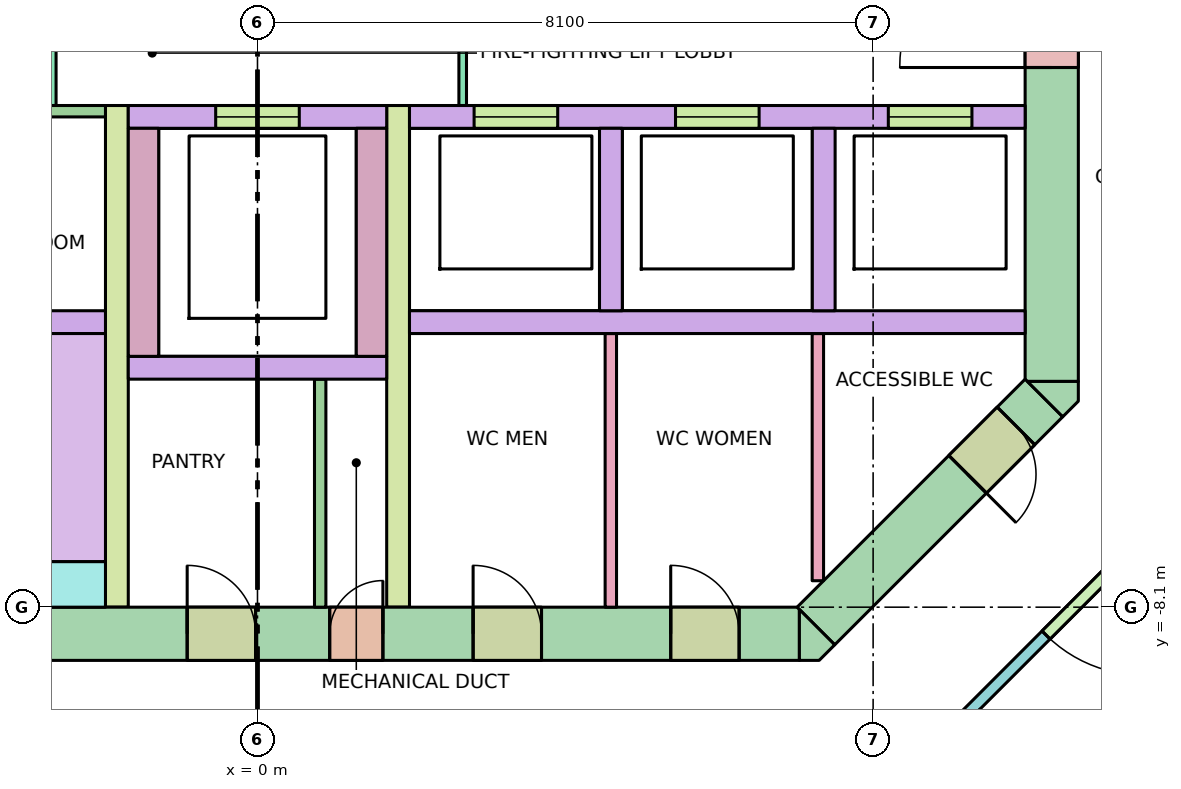
"""IFC4 building model, lengths in metres.
Left out: names, types, materials, properties, quantities, classifications, styles, units other than length and angle.
Written with IfcOpenShell. Run it as: python <this file> out.ifc"""

import sys

from ifc_helpers import new_model, si_unit, direction, frame, frame_2d, origin, place, context, subcontext, project, spatial, polyline, rectangle, outline, extrude, element, fill, save


model = new_model("IFC4")
c1 = context("Model", 3, precision=1e-05, world=origin(), true_north=direction((0.0, 1.0)))
c2 = subcontext(c1, "Body", "Model", "MODEL_VIEW")
j1 = project(units=[si_unit("LENGTHUNIT", "METRE"), si_unit("PLANEANGLEUNIT", "RADIAN")], contexts=[c1])
p1 = place(None, origin())
s1 = spatial("IfcSite", under=j1, at=p1, CompositionType="ELEMENT")
p2 = place(p1, origin())
s2 = spatial("IfcBuilding", under=s1, at=p2, CompositionType="ELEMENT")
p3 = place(p2, frame((0.0, 0.0, 176.4)))
s3 = spatial("IfcBuildingStorey", under=s2, at=p3, CompositionType="ELEMENT", Elevation=176.4)
p4 = place(p3, frame((-7.13, -8.45, -0.28), z_axis=(0.0, 0.0, 1.0), x_axis=(1.0, 0.0, 0.0)))
e1 = element("IfcWall", 1, at=p4, inside=s3, PredefinedType="SHEAR", context=c2, shape_type="SweptSolid", body=[
    extrude(rectangle(XDim=14.26, YDim=0.7, at=frame_2d((7.13, 0.0))), origin(), (0.0, 0.0, 1.0), 3.7),
])
p5 = place(p4, frame((8.08, 0.0, 0.28)))
e2 = element("IfcOpeningElement", 2, at=p5, cuts=e1, PredefinedType="OPENING", context=c2, shape_type="SweptSolid", body=[
    extrude(rectangle(XDim=0.7, YDim=2.1, at=frame_2d((0.35, 1.05))), frame((0.0, 0.36, 0.0), z_axis=(0.0, -1.0, 0.0), x_axis=(1.0, 0.0, 0.0)), (0.0, 0.0, 1.0), 0.72),
])
p6 = place(p4, frame((6.205, 0.0, 0.28)))
e3 = element("IfcOpeningElement", 3, at=p6, cuts=e1, PredefinedType="OPENING", context=c2, shape_type="SweptSolid", body=[
    extrude(rectangle(XDim=0.9, YDim=2.1, at=frame_2d((0.45, 1.05))), frame((0.0, 0.36, 0.0), z_axis=(0.0, -1.0, 0.0), x_axis=(1.0, 0.0, 0.0)), (0.0, 0.0, 1.0), 0.72),
])
p7 = place(p4, frame((9.967, 0.0, 0.28)))
e4 = element("IfcOpeningElement", 4, at=p7, cuts=e1, PredefinedType="OPENING", context=c2, shape_type="SweptSolid", body=[
    extrude(rectangle(XDim=0.9, YDim=2.1, at=frame_2d((0.45, 1.05))), frame((0.0, 0.36, 0.0), z_axis=(0.0, -1.0, 0.0), x_axis=(1.0, 0.0, 0.0)), (0.0, 0.0, 1.0), 0.72),
])
p8 = place(p4, frame((12.567, 0.0, 0.28)))
e5 = element("IfcOpeningElement", 5, at=p8, cuts=e1, PredefinedType="OPENING", context=c2, shape_type="SweptSolid", body=[
    extrude(rectangle(XDim=0.9, YDim=2.1, at=frame_2d((0.45, 1.05))), frame((0.0, 0.36, 0.0), z_axis=(0.0, -1.0, 0.0), x_axis=(1.0, 0.0, 0.0)), (0.0, 0.0, 1.0), 0.72),
])
p9 = place(p3, frame((10.45, -5.13, -0.28), z_axis=(0.0, 0.0, 1.0), x_axis=(0.0, 1.0, 0.0)))
e6 = element("IfcWall", 6, at=p9, inside=s3, PredefinedType="SHEAR", context=c2, shape_type="SweptSolid", body=[
    extrude(rectangle(XDim=10.26, YDim=0.7, at=frame_2d((5.13, 0.0))), origin(), (0.0, 0.0, 1.0), 3.7),
])
p10 = place(p9, frame((4.13, 0.0, 0.28)))
e7 = element("IfcOpeningElement", 7, at=p10, cuts=e6, PredefinedType="OPENING", context=c2, shape_type="SweptSolid", body=[
    extrude(rectangle(XDim=2.0, YDim=2.1, at=frame_2d((1.0, 1.05))), frame((0.0, 0.36, 0.0), z_axis=(0.0, -1.0, 0.0), x_axis=(1.0, 0.0, 0.0)), (0.0, 0.0, 1.0), 0.72),
])
p11 = place(p3, frame((10.347, -5.347, -0.28), z_axis=(0.0, 0.0, 1.0), x_axis=(-0.707106781187, -0.707106781187, 0.0)))
e8 = element("IfcWall", 8, at=p11, inside=s3, PredefinedType="SHEAR", context=c2, shape_type="SweptSolid", body=[
    extrude(rectangle(XDim=4.243, YDim=0.7, at=frame_2d((2.121, 0.0))), origin(), (0.0, 0.0, 1.0), 3.7),
])
p12 = place(p11, frame((0.52, 0.0, 0.28)))
e9 = element("IfcOpeningElement", 9, at=p12, cuts=e8, PredefinedType="OPENING", context=c2, shape_type="SweptSolid", body=[
    extrude(rectangle(XDim=0.9, YDim=2.1, at=frame_2d((0.45, 1.05))), frame((0.0, 0.36, 0.0), z_axis=(0.0, -1.0, 0.0), x_axis=(1.0, 0.0, 0.0)), (0.0, 0.0, 1.0), 0.72),
])
p13 = place(p3, frame((0.0, 0.0, -0.28)))
e10 = element("IfcWall", 10, at=p13, inside=s3, PredefinedType="SHEAR", context=c2, shape_type="SweptSolid", body=[
    extrude(outline(polyline([(7.39, -8.8), (7.13, -8.8), (7.13, -8.8), (7.13, -8.13), (7.595, -8.595), (7.595, -8.595), (7.595, -8.595), (7.39, -8.8)])), origin(), (0.0, 0.0, 1.0), 3.7),
])
p14 = place(p3, frame((0.0, 0.0, -0.28)))
e11 = element("IfcWall", 11, at=p14, inside=s3, PredefinedType="SHEAR", context=c2, shape_type="SweptSolid", body=[
    extrude(outline(polyline([(10.8, -5.39), (10.595, -5.595), (10.595, -5.595), (10.595, -5.595), (10.13, -5.13), (10.8, -5.13), (10.8, -5.13), (10.8, -5.39)])), origin(), (0.0, 0.0, 1.0), 3.7),
])
for number, where, z_axis, x_axis in (
    (12, (-10.1, -4.35, 0.0), (0.0, 0.0, 1.0), (1.0, 0.0, 0.0)),
    (13, (2.0, -4.35, 0.0), (0.0, 0.0, 1.0), (1.0, 0.0, 0.0)),
):
    element("IfcWall", number, at=place(p3, frame(where, z_axis=z_axis, x_axis=x_axis)), inside=s3, PredefinedType="SOLIDWALL", context=c2, shape_type="SweptSolid", body=[
        extrude(rectangle(XDim=8.1, YDim=0.3, at=frame_2d((4.05, 0.0))), origin(), (0.0, 0.0, 1.0), 3.42),
    ])
p15 = place(p3, frame((2.0, -1.65, 0.0), z_axis=(0.0, 0.0, 1.0), x_axis=(1.0, 0.0, 0.0)))
e14 = element("IfcWall", 14, at=p15, inside=s3, PredefinedType="SOLIDWALL", context=c2, shape_type="SweptSolid", body=[
    extrude(rectangle(XDim=8.1, YDim=0.3, at=frame_2d((4.05, 0.0))), origin(), (0.0, 0.0, 1.0), 3.42),
])
p16 = place(p15, frame((0.85, 0.0, 0.0)))
e15 = element("IfcOpeningElement", 15, at=p16, cuts=e14, PredefinedType="OPENING", context=c2, shape_type="SweptSolid", body=[
    extrude(rectangle(XDim=1.1, YDim=2.1, at=frame_2d((0.55, 1.05))), frame((0.0, 0.16, 0.0), z_axis=(0.0, -1.0, 0.0), x_axis=(1.0, 0.0, 0.0)), (0.0, 0.0, 1.0), 0.32),
])
p17 = place(p15, frame((3.5, 0.0, 0.0)))
e16 = element("IfcOpeningElement", 16, at=p17, cuts=e14, PredefinedType="OPENING", context=c2, shape_type="SweptSolid", body=[
    extrude(rectangle(XDim=1.1, YDim=2.1, at=frame_2d((0.55, 1.05))), frame((0.0, 0.16, 0.0), z_axis=(0.0, -1.0, 0.0), x_axis=(1.0, 0.0, 0.0)), (0.0, 0.0, 1.0), 0.32),
])
p18 = place(p15, frame((6.3, 0.0, 0.0)))
e17 = element("IfcOpeningElement", 17, at=p18, cuts=e14, PredefinedType="OPENING", context=c2, shape_type="SweptSolid", body=[
    extrude(rectangle(XDim=1.1, YDim=2.1, at=frame_2d((0.55, 1.05))), frame((0.0, 0.16, 0.0), z_axis=(0.0, -1.0, 0.0), x_axis=(1.0, 0.0, 0.0)), (0.0, 0.0, 1.0), 0.32),
])
for number, where, z_axis, x_axis in (
    (18, (4.65, -4.2, 0.0), (0.0, 0.0, 1.0), (0.0, 1.0, 0.0)),
    (19, (7.45, -4.2, 0.0), (0.0, 0.0, 1.0), (0.0, 1.0, 0.0)),
):
    element("IfcWall", number, at=place(p3, frame(where, z_axis=z_axis, x_axis=x_axis)), inside=s3, PredefinedType="SOLIDWALL", context=c2, shape_type="SweptSolid", body=[
        extrude(rectangle(XDim=2.4, YDim=0.3, at=frame_2d((1.2, 0.0))), origin(), (0.0, 0.0, 1.0), 3.42),
    ])
for number, where, z_axis, x_axis in (
    (20, (-1.85, -8.1, 0.0), (0.0, 0.0, 1.0), (0.0, 1.0, 0.0)),
    (21, (1.85, -8.1, 0.0), (0.0, 0.0, 1.0), (0.0, 1.0, 0.0)),
):
    element("IfcWall", number, at=place(p3, frame(where, z_axis=z_axis, x_axis=x_axis)), inside=s3, PredefinedType="SHEAR", context=c2, shape_type="SweptSolid", body=[
        extrude(rectangle(XDim=6.6, YDim=0.3, at=frame_2d((3.3, 0.0))), origin(), (0.0, 0.0, 1.0), 3.42),
    ])
p19 = place(p3, frame((-1.7, -1.65, 0.0), z_axis=(0.0, 0.0, 1.0), x_axis=(1.0, 0.0, 0.0)))
e22 = element("IfcWall", 22, at=p19, inside=s3, PredefinedType="SOLIDWALL", context=c2, shape_type="SweptSolid", body=[
    extrude(rectangle(XDim=3.4, YDim=0.3, at=frame_2d((1.7, 0.0))), origin(), (0.0, 0.0, 1.0), 3.42),
])
p20 = place(p19, frame((1.15, 0.0, 0.0)))
e23 = element("IfcOpeningElement", 23, at=p20, cuts=e22, PredefinedType="OPENING", context=c2, shape_type="SweptSolid", body=[
    extrude(rectangle(XDim=1.1, YDim=2.1, at=frame_2d((0.55, 1.05))), frame((0.0, 0.16, 0.0), z_axis=(0.0, -1.0, 0.0), x_axis=(1.0, 0.0, 0.0)), (0.0, 0.0, 1.0), 0.32),
])
for number, where, z_axis, x_axis in (
    (24, (-1.5, -4.8, 0.0), (0.0, 0.0, 1.0), (0.0, 1.0, 0.0)),
    (25, (1.5, -4.8, 0.0), (0.0, 0.0, 1.0), (0.0, 1.0, 0.0)),
):
    element("IfcWall", number, at=place(p3, frame(where, z_axis=z_axis, x_axis=x_axis)), inside=s3, PredefinedType="SOLIDWALL", context=c2, shape_type="SweptSolid", body=[
        extrude(rectangle(XDim=3.0, YDim=0.4, at=frame_2d((1.5, 0.0))), origin(), (0.0, 0.0, 1.0), 3.42),
    ])
p21 = place(p3, frame((-1.7, -4.95, 0.0), z_axis=(0.0, 0.0, 1.0), x_axis=(1.0, 0.0, 0.0)))
e26 = element("IfcWall", 26, at=p21, inside=s3, PredefinedType="SOLIDWALL", context=c2, shape_type="SweptSolid", body=[
    extrude(rectangle(XDim=3.4, YDim=0.3, at=frame_2d((1.7, 0.0))), origin(), (0.0, 0.0, 1.0), 3.42),
])
p22 = place(p3, frame((-7.37, -7.8, 0.0), z_axis=(0.0, 0.0, 1.0), x_axis=(1.0, 0.0, 0.0)))
e27 = element("IfcWall", 27, at=p22, inside=s3, PredefinedType="SHEAR", context=c2, shape_type="SweptSolid", body=[
    extrude(rectangle(XDim=5.37, YDim=0.6, at=frame_2d((2.685, 0.0))), origin(), (0.0, 0.0, 1.0), 3.42),
])
p23 = place(p3, frame((-2.7, -1.5, 0.0), z_axis=(0.0, 0.0, 1.0), x_axis=(0.0, 1.0, 0.0)))
e28 = element("IfcWall", 28, at=p23, inside=s3, PredefinedType="PARTITIONING", context=c2, shape_type="SweptSolid", body=[
    extrude(rectangle(XDim=3.0, YDim=0.1, at=frame_2d((1.5, 0.0))), origin(), (0.0, 0.0, 1.0), 3.42),
])
p24 = place(p23, frame((0.9, 0.0, 0.0)))
e29 = element("IfcOpeningElement", 29, at=p24, cuts=e28, PredefinedType="OPENING", context=c2, shape_type="SweptSolid", body=[
    extrude(rectangle(XDim=1.2, YDim=2.1, at=frame_2d((0.6, 1.05))), frame((0.0, 0.06, 0.0), z_axis=(0.0, -1.0, 0.0), x_axis=(1.0, 0.0, 0.0)), (0.0, 0.0, 1.0), 0.12),
])
p25 = place(p3, frame((2.7, -1.5, 0.0), z_axis=(0.0, 0.0, 1.0), x_axis=(0.0, 1.0, 0.0)))
e30 = element("IfcWall", 30, at=p25, inside=s3, PredefinedType="PARTITIONING", context=c2, shape_type="SweptSolid", body=[
    extrude(rectangle(XDim=3.0, YDim=0.1, at=frame_2d((1.5, 0.0))), origin(), (0.0, 0.0, 1.0), 3.42),
])
p26 = place(p25, frame((0.9, 0.0, 0.0)))
e31 = element("IfcOpeningElement", 31, at=p26, cuts=e30, PredefinedType="OPENING", context=c2, shape_type="SweptSolid", body=[
    extrude(rectangle(XDim=1.2, YDim=2.1, at=frame_2d((0.6, 1.05))), frame((0.0, 0.06, 0.0), z_axis=(0.0, -1.0, 0.0), x_axis=(1.0, 0.0, 0.0)), (0.0, 0.0, 1.0), 0.12),
])
p27 = place(p3, frame((0.825, -8.1, 0.0), z_axis=(0.0, 0.0, 1.0), x_axis=(0.0, 1.0, 0.0)))
e32 = element("IfcWall", 32, at=p27, inside=s3, PredefinedType="PARTITIONING", context=c2, shape_type="SweptSolid", body=[
    extrude(rectangle(XDim=3.0, YDim=0.15, at=frame_2d((1.5, 0.0))), origin(), (0.0, 0.0, 1.0), 3.42),
])
p28 = place(p3, frame((4.649, -8.1, 0.0), z_axis=(0.0, 0.0, 1.0), x_axis=(0.0, 1.0, 0.0)))
e33 = element("IfcWall", 33, at=p28, inside=s3, PredefinedType="PARTITIONING", context=c2, shape_type="SweptSolid", body=[
    extrude(rectangle(XDim=3.6, YDim=0.15, at=frame_2d((1.8, 0.0))), origin(), (0.0, 0.0, 1.0), 3.42),
])
p29 = place(p3, frame((7.373, -7.752, 0.0), z_axis=(0.0, 0.0, 1.0), x_axis=(0.0, 1.0, 0.0)))
e34 = element("IfcWall", 34, at=p29, inside=s3, PredefinedType="PARTITIONING", context=c2, shape_type="SweptSolid", body=[
    extrude(rectangle(XDim=3.252, YDim=0.15, at=frame_2d((1.626, 0.0))), origin(), (0.0, 0.0, 1.0), 3.42),
])
p30 = place(p3, frame((-10.1, -1.575, 0.0), z_axis=(0.0, 0.0, 1.0), x_axis=(1.0, 0.0, 0.0)))
e35 = element("IfcWall", 35, at=p30, inside=s3, PredefinedType="PARTITIONING", context=c2, shape_type="SweptSolid", body=[
    extrude(rectangle(XDim=8.1, YDim=0.15, at=frame_2d((4.05, 0.0))), origin(), (0.0, 0.0, 1.0), 3.42),
])
p31 = place(p30, frame((2.333, 0.0, 0.0)))
e36 = element("IfcOpeningElement", 36, at=p31, cuts=e35, PredefinedType="OPENING", context=c2, shape_type="SweptSolid", body=[
    extrude(rectangle(XDim=0.9, YDim=2.1, at=frame_2d((0.45, 1.05))), frame((0.0, 0.085, 0.0), z_axis=(0.0, -1.0, 0.0), x_axis=(1.0, 0.0, 0.0)), (0.0, 0.0, 1.0), 0.17),
])
p32 = place(p30, frame((6.35, 0.0, 0.0)))
e37 = element("IfcOpeningElement", 37, at=p32, cuts=e35, PredefinedType="OPENING", context=c2, shape_type="SweptSolid", body=[
    extrude(rectangle(XDim=0.9, YDim=2.1, at=frame_2d((0.45, 1.05))), frame((0.0, 0.085, 0.0), z_axis=(0.0, -1.0, 0.0), x_axis=(1.0, 0.0, 0.0)), (0.0, 0.0, 1.0), 0.17),
])
p33 = place(p3, frame((12.638, -6.204, 0.0), z_axis=(0.0, 0.0, 1.0), x_axis=(-0.707106781187, -0.707106781187, 0.0)))
e38 = element("IfcWall", 38, at=p33, inside=s3, PredefinedType="PARTITIONING", context=c2, shape_type="SweptSolid", body=[
    extrude(rectangle(XDim=6.271, YDim=0.15, at=frame_2d((3.135, 0.0))), origin(), (0.0, 0.0, 1.0), 2.62),
])
p34 = place(p33, frame((4.935, 0.0, 0.0)))
e39 = element("IfcOpeningElement", 39, at=p34, cuts=e38, PredefinedType="OPENING", context=c2, shape_type="SweptSolid", body=[
    extrude(rectangle(XDim=0.9, YDim=2.1, at=frame_2d((0.45, 1.05))), frame((0.0, 0.085, 0.0), z_axis=(0.0, -1.0, 0.0), x_axis=(1.0, 0.0, 0.0)), (0.0, 0.0, 1.0), 0.17),
])
p35 = place(p33, frame((1.4, 0.0, 0.0)))
e40 = element("IfcOpeningElement", 40, at=p35, cuts=e38, PredefinedType="OPENING", context=c2, shape_type="SweptSolid", body=[
    extrude(rectangle(XDim=1.8, YDim=2.1, at=frame_2d((0.9, 1.05))), frame((0.0, 0.085, 0.0), z_axis=(0.0, -1.0, 0.0), x_axis=(1.0, 0.0, 0.0)), (0.0, 0.0, 1.0), 0.17),
])
p36 = place(p3, frame((9.474, -9.474, 0.0), z_axis=(0.0, 0.0, 1.0), x_axis=(0.707106781187, -0.707106781187, 0.0)))
e41 = element("IfcWall", 41, at=p36, inside=s3, PredefinedType="PARTITIONING", context=c2, shape_type="SweptSolid", body=[
    extrude(rectangle(XDim=5.439, YDim=0.1, at=frame_2d((2.719, 0.0))), origin(), (0.0, 0.0, 1.0), 2.62),
])
p37 = place(p16, origin())
e42 = element("IfcDoor", 42, at=p37, inside=s3, OperationType="DOUBLE_DOOR_SLIDING", PredefinedType="DOOR", context=c2, shape_type="SweptSolid", body=[
    extrude(rectangle(XDim=1.1, YDim=2.1, at=frame_2d((0.55, 1.05))), frame((0.0, 0.025, 0.0), z_axis=(0.0, -1.0, 0.0), x_axis=(1.0, 0.0, 0.0)), (0.0, 0.0, 1.0), 0.05),
])
fill(e15, e42)
p38 = place(p17, origin())
e43 = element("IfcDoor", 43, at=p38, inside=s3, OperationType="DOUBLE_DOOR_SLIDING", PredefinedType="DOOR", context=c2, shape_type="SweptSolid", body=[
    extrude(rectangle(XDim=1.1, YDim=2.1, at=frame_2d((0.55, 1.05))), frame((0.0, 0.025, 0.0), z_axis=(0.0, -1.0, 0.0), x_axis=(1.0, 0.0, 0.0)), (0.0, 0.0, 1.0), 0.05),
])
fill(e16, e43)
p39 = place(p18, origin())
e44 = element("IfcDoor", 44, at=p39, inside=s3, OperationType="DOUBLE_DOOR_SLIDING", PredefinedType="DOOR", context=c2, shape_type="SweptSolid", body=[
    extrude(rectangle(XDim=1.1, YDim=2.1, at=frame_2d((0.55, 1.05))), frame((0.0, 0.025, 0.0), z_axis=(0.0, -1.0, 0.0), x_axis=(1.0, 0.0, 0.0)), (0.0, 0.0, 1.0), 0.05),
])
fill(e17, e44)
p40 = place(p20, origin())
e45 = element("IfcDoor", 45, at=p40, inside=s3, OperationType="DOUBLE_DOOR_SLIDING", PredefinedType="DOOR", context=c2, shape_type="SweptSolid", body=[
    extrude(rectangle(XDim=1.1, YDim=2.1, at=frame_2d((0.55, 1.05))), frame((0.0, 0.025, 0.0), z_axis=(0.0, -1.0, 0.0), x_axis=(1.0, 0.0, 0.0)), (0.0, 0.0, 1.0), 0.05),
])
fill(e23, e45)
p41 = place(p10, origin())
e46 = element("IfcDoor", 46, at=p41, inside=s3, OperationType="DOUBLE_DOOR_SINGLE_SWING", PredefinedType="DOOR", context=c2, shape_type="SweptSolid", body=[
    extrude(rectangle(XDim=2.0, YDim=2.1, at=frame_2d((1.0, 1.05))), frame((0.0, 0.025, 0.0), z_axis=(0.0, -1.0, 0.0), x_axis=(1.0, 0.0, 0.0)), (0.0, 0.0, 1.0), 0.05),
])
fill(e7, e46)
p42 = place(p5, origin())
e47 = element("IfcDoor", 47, at=p42, inside=s3, OperationType="SINGLE_SWING_RIGHT", PredefinedType="DOOR", context=c2, shape_type="SweptSolid", body=[
    extrude(rectangle(XDim=0.7, YDim=2.1, at=frame_2d((0.35, 1.05))), frame((0.0, 0.025, 0.0), z_axis=(0.0, -1.0, 0.0), x_axis=(1.0, 0.0, 0.0)), (0.0, 0.0, 1.0), 0.05),
])
fill(e2, e47)
p43 = place(p6, origin())
e48 = element("IfcDoor", 48, at=p43, inside=s3, OperationType="SINGLE_SWING_LEFT", PredefinedType="DOOR", context=c2, shape_type="SweptSolid", body=[
    extrude(rectangle(XDim=0.9, YDim=2.1, at=frame_2d((0.45, 1.05))), frame((0.0, 0.025, 0.0), z_axis=(0.0, -1.0, 0.0), x_axis=(1.0, 0.0, 0.0)), (0.0, 0.0, 1.0), 0.05),
])
fill(e3, e48)
p44 = place(p7, origin())
e49 = element("IfcDoor", 49, at=p44, inside=s3, OperationType="SINGLE_SWING_LEFT", PredefinedType="DOOR", context=c2, shape_type="SweptSolid", body=[
    extrude(rectangle(XDim=0.9, YDim=2.1, at=frame_2d((0.45, 1.05))), frame((0.0, 0.025, 0.0), z_axis=(0.0, -1.0, 0.0), x_axis=(1.0, 0.0, 0.0)), (0.0, 0.0, 1.0), 0.05),
])
fill(e4, e49)
p45 = place(p8, origin())
e50 = element("IfcDoor", 50, at=p45, inside=s3, OperationType="SINGLE_SWING_LEFT", PredefinedType="DOOR", context=c2, shape_type="SweptSolid", body=[
    extrude(rectangle(XDim=0.9, YDim=2.1, at=frame_2d((0.45, 1.05))), frame((0.0, 0.025, 0.0), z_axis=(0.0, -1.0, 0.0), x_axis=(1.0, 0.0, 0.0)), (0.0, 0.0, 1.0), 0.05),
])
fill(e5, e50)
p46 = place(p12, origin())
e51 = element("IfcDoor", 51, at=p46, inside=s3, OperationType="SINGLE_SWING_RIGHT", PredefinedType="DOOR", context=c2, shape_type="SweptSolid", body=[
    extrude(rectangle(XDim=0.9, YDim=2.1, at=frame_2d((0.45, 1.05))), frame((0.0, 0.025, 0.0), z_axis=(0.0, -1.0, 0.0), x_axis=(1.0, 0.0, 0.0)), (0.0, 0.0, 1.0), 0.05),
])
fill(e9, e51)
p47 = place(p35, origin())
e52 = element("IfcDoor", 52, at=p47, inside=s3, OperationType="DOUBLE_DOOR_SINGLE_SWING", PredefinedType="DOOR", context=c2, shape_type="SweptSolid", body=[
    extrude(rectangle(XDim=1.8, YDim=2.1, at=frame_2d((0.9, 1.05))), frame((0.0, 0.025, 0.0), z_axis=(0.0, -1.0, 0.0), x_axis=(1.0, 0.0, 0.0)), (0.0, 0.0, 1.0), 0.05),
])
fill(e40, e52)
save(model, sys.argv[1])
